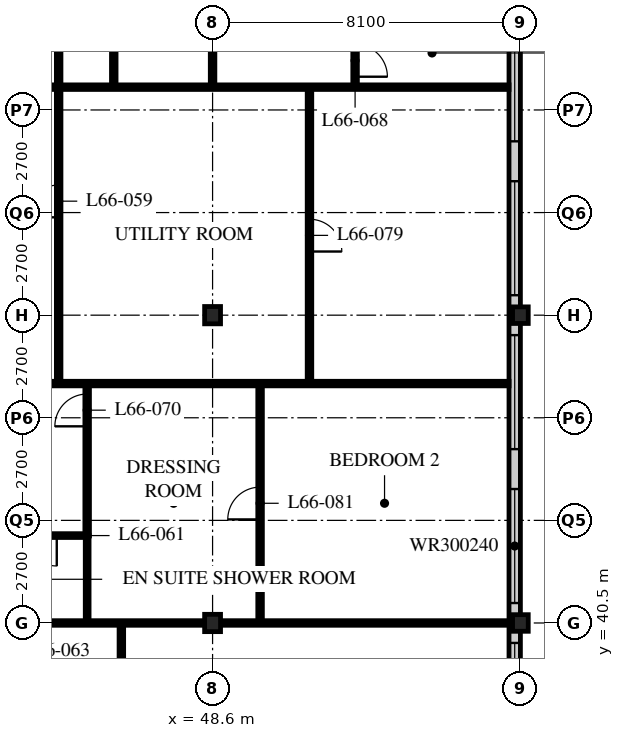
"""IFC4 building model, lengths in metres.
Left out: names, types, materials, properties, quantities, classifications, styles, units other than length and angle.
Written with IfcOpenShell. Run it as: python <this file> out.ifc"""

import sys

from ifc_helpers import new_model, si_unit, direction, frame, frame_2d, origin, origin_2d, place, context, subcontext, project, spatial, rectangle, i_section, extrude, element, fill, save


model = new_model("IFC4")
c1 = context("Model", 3, precision=1e-05, world=origin(), true_north=direction((0.0, 1.0)))
c2 = subcontext(c1, "Body", "Model", "MODEL_VIEW")
j1 = project(units=[si_unit("LENGTHUNIT", "METRE"), si_unit("PLANEANGLEUNIT", "RADIAN")], contexts=[c1])
p1 = place(None, origin())
s1 = spatial("IfcSite", under=j1, at=p1, CompositionType="ELEMENT")
p2 = place(p1, origin())
s2 = spatial("IfcBuilding", under=s1, at=p2, CompositionType="ELEMENT")
p3 = place(p2, frame((0.0, 0.0, 258.0)))
s3 = spatial("IfcBuildingStorey", under=s2, at=p3, CompositionType="ELEMENT", Elevation=258.0)
for number, where, z_axis, x_axis in (
    (1, (48.6, 40.5, 0.0), (0.0, 0.0, 1.0), (1.0, 0.0, 0.0)),
    (2, (48.6, 48.6, 0.0), (0.0, 0.0, 1.0), (1.0, 0.0, 0.0)),
):
    element("IfcColumn", number, at=place(p3, frame(where, z_axis=z_axis, x_axis=x_axis)), inside=s3, PredefinedType="COLUMN", context=c2, shape_type="SweptSolid", body=[
        extrude(i_section(OverallWidth=0.418, OverallDepth=0.456, WebThickness=0.042, FlangeThickness=0.067, FilletRadius=0.015, at=origin_2d()), origin(), (0.0, 0.0, 1.0), 3.9),
    ])
for number, where, z_axis, x_axis in (
    (3, (56.7, 40.5, 0.0), (0.0, 0.0, 1.0), (1.0, 0.0, 0.0)),
    (4, (56.7, 48.6, 0.0), (0.0, 0.0, 1.0), (1.0, 0.0, 0.0)),
):
    element("IfcColumn", number, at=place(p3, frame(where, z_axis=z_axis, x_axis=x_axis)), inside=s3, PredefinedType="COLUMN", context=c2, shape_type="SweptSolid", body=[
        extrude(i_section(OverallWidth=0.412, OverallDepth=0.437, WebThickness=0.036, FlangeThickness=0.058, FilletRadius=0.015, at=origin_2d()), origin(), (0.0, 0.0, 1.0), 3.9),
    ])
p4 = place(p3, frame((56.55, 24.6, 0.0), z_axis=(0.0, 0.0, 1.0), x_axis=(0.0, 1.0, 0.0)))
e5 = element("IfcWall", 5, at=p4, inside=s3, PredefinedType="SOLIDWALL", context=c2, shape_type="SweptSolid", body=[
    extrude(rectangle(XDim=32.1, YDim=0.3, at=frame_2d((16.05, 0.0))), origin(), (0.0, 0.0, 1.0), 3.69),
])
p5 = place(p4, frame((0.225, 0.0, 0.6)))
e6 = element("IfcOpeningElement", 6, at=p5, cuts=e5, PredefinedType="OPENING", context=c2, shape_type="SweptSolid", body=[
    extrude(rectangle(XDim=3.0, YDim=2.4, at=frame_2d((1.5, 1.2))), frame((0.0, 0.16, 0.0), z_axis=(0.0, -1.0, 0.0), x_axis=(1.0, 0.0, 0.0)), (0.0, 0.0, 1.0), 0.32),
])
p6 = place(p4, frame((4.275, 0.0, 0.6)))
e7 = element("IfcOpeningElement", 7, at=p6, cuts=e5, PredefinedType="OPENING", context=c2, shape_type="SweptSolid", body=[
    extrude(rectangle(XDim=3.0, YDim=2.4, at=frame_2d((1.5, 1.2))), frame((0.0, 0.16, 0.0), z_axis=(0.0, -1.0, 0.0), x_axis=(1.0, 0.0, 0.0)), (0.0, 0.0, 1.0), 0.32),
])
p7 = place(p4, frame((8.325, 0.0, 0.6)))
e8 = element("IfcOpeningElement", 8, at=p7, cuts=e5, PredefinedType="OPENING", context=c2, shape_type="SweptSolid", body=[
    extrude(rectangle(XDim=3.0, YDim=2.4, at=frame_2d((1.5, 1.2))), frame((0.0, 0.16, 0.0), z_axis=(0.0, -1.0, 0.0), x_axis=(1.0, 0.0, 0.0)), (0.0, 0.0, 1.0), 0.32),
])
p8 = place(p4, frame((12.375, 0.0, 0.6)))
e9 = element("IfcOpeningElement", 9, at=p8, cuts=e5, PredefinedType="OPENING", context=c2, shape_type="SweptSolid", body=[
    extrude(rectangle(XDim=3.0, YDim=2.4, at=frame_2d((1.5, 1.2))), frame((0.0, 0.16, 0.0), z_axis=(0.0, -1.0, 0.0), x_axis=(1.0, 0.0, 0.0)), (0.0, 0.0, 1.0), 0.32),
])
p9 = place(p4, frame((16.425, 0.0, 0.6)))
e10 = element("IfcOpeningElement", 10, at=p9, cuts=e5, PredefinedType="OPENING", context=c2, shape_type="SweptSolid", body=[
    extrude(rectangle(XDim=3.0, YDim=2.4, at=frame_2d((1.5, 1.2))), frame((0.0, 0.16, 0.0), z_axis=(0.0, -1.0, 0.0), x_axis=(1.0, 0.0, 0.0)), (0.0, 0.0, 1.0), 0.32),
])
p10 = place(p4, frame((20.475, 0.0, 0.6)))
e11 = element("IfcOpeningElement", 11, at=p10, cuts=e5, PredefinedType="OPENING", context=c2, shape_type="SweptSolid", body=[
    extrude(rectangle(XDim=3.0, YDim=2.4, at=frame_2d((1.5, 1.2))), frame((0.0, 0.16, 0.0), z_axis=(0.0, -1.0, 0.0), x_axis=(1.0, 0.0, 0.0)), (0.0, 0.0, 1.0), 0.32),
])
p11 = place(p4, frame((24.525, 0.0, 0.6)))
e12 = element("IfcOpeningElement", 12, at=p11, cuts=e5, PredefinedType="OPENING", context=c2, shape_type="SweptSolid", body=[
    extrude(rectangle(XDim=3.0, YDim=2.4, at=frame_2d((1.5, 1.2))), frame((0.0, 0.16, 0.0), z_axis=(0.0, -1.0, 0.0), x_axis=(1.0, 0.0, 0.0)), (0.0, 0.0, 1.0), 0.32),
])
p12 = place(p4, frame((28.575, 0.0, 0.6)))
e13 = element("IfcOpeningElement", 13, at=p12, cuts=e5, PredefinedType="OPENING", context=c2, shape_type="SweptSolid", body=[
    extrude(rectangle(XDim=3.0, YDim=2.4, at=frame_2d((1.5, 1.2))), frame((0.0, 0.16, 0.0), z_axis=(0.0, -1.0, 0.0), x_axis=(1.0, 0.0, 0.0)), (0.0, 0.0, 1.0), 0.32),
])
p13 = place(p3, frame((42.9, 46.8, 0.0), z_axis=(0.0, 0.0, 1.0), x_axis=(1.0, 0.0, 0.0)))
e14 = element("IfcWall", 14, at=p13, inside=s3, PredefinedType="PARTITIONING", context=c2, shape_type="SweptSolid", body=[
    extrude(rectangle(XDim=13.5, YDim=0.12, at=frame_2d((6.75, 0.0))), origin(), (0.0, 0.0, 1.0), 3.69),
])
p14 = place(p3, frame((36.45, 54.6, 0.0), z_axis=(0.0, 0.0, 1.0), x_axis=(1.0, 0.0, 0.0)))
e15 = element("IfcWall", 15, at=p14, inside=s3, PredefinedType="PARTITIONING", context=c2, shape_type="SweptSolid", body=[
    extrude(rectangle(XDim=19.95, YDim=0.12, at=frame_2d((9.975, 0.0))), origin(), (0.0, 0.0, 1.0), 3.69),
])
p15 = place(p14, frame((1.675, 0.0, 0.0)))
e16 = element("IfcOpeningElement", 16, at=p15, cuts=e15, PredefinedType="OPENING", context=c2, shape_type="SweptSolid", body=[
    extrude(rectangle(XDim=0.85, YDim=2.1, at=frame_2d((0.425, 1.05))), frame((0.0, 0.07, 0.0), z_axis=(0.0, -1.0, 0.0), x_axis=(1.0, 0.0, 0.0)), (0.0, 0.0, 1.0), 0.14),
])
p16 = place(p3, frame((44.55, 64.5, 0.0), z_axis=(0.0, 0.0, 1.0), x_axis=(0.0, -1.0, 0.0)))
e17 = element("IfcWall", 17, at=p16, inside=s3, PredefinedType="PARTITIONING", context=c2, shape_type="SweptSolid", body=[
    extrude(rectangle(XDim=17.7, YDim=0.12, at=frame_2d((8.85, 0.0))), origin(), (0.0, 0.0, 1.0), 3.69),
])
p17 = place(p16, frame((12.475, 0.0, 0.0)))
e18 = element("IfcOpeningElement", 18, at=p17, cuts=e17, PredefinedType="OPENING", context=c2, shape_type="SweptSolid", body=[
    extrude(rectangle(XDim=0.85, YDim=2.1, at=frame_2d((0.425, 1.05))), frame((0.0, 0.07, 0.0), z_axis=(0.0, -1.0, 0.0), x_axis=(1.0, 0.0, 0.0)), (0.0, 0.0, 1.0), 0.14),
])
p18 = place(p16, frame((4.525, 0.0, 0.0)))
e19 = element("IfcOpeningElement", 19, at=p18, cuts=e17, PredefinedType="OPENING", context=c2, shape_type="SweptSolid", body=[
    extrude(rectangle(XDim=0.85, YDim=2.1, at=frame_2d((0.425, 1.05))), frame((0.0, 0.07, 0.0), z_axis=(0.0, -1.0, 0.0), x_axis=(1.0, 0.0, 0.0)), (0.0, 0.0, 1.0), 0.14),
])
p19 = place(p3, frame((42.9, 42.8, 0.0), z_axis=(0.0, 0.0, 1.0), x_axis=(1.0, 0.0, 0.0)))
e20 = element("IfcWall", 20, at=p19, inside=s3, PredefinedType="PARTITIONING", context=c2, shape_type="SweptSolid", body=[
    extrude(rectangle(XDim=2.4, YDim=0.1, at=frame_2d((1.2, 0.0))), origin(), (0.0, 0.0, 1.0), 3.69),
])
p20 = place(p19, frame((0.8, 0.0, 0.0)))
e21 = element("IfcOpeningElement", 21, at=p20, cuts=e20, PredefinedType="OPENING", context=c2, shape_type="SweptSolid", body=[
    extrude(rectangle(XDim=0.8, YDim=2.1, at=frame_2d((0.4, 1.05))), frame((0.0, 0.06, 0.0), z_axis=(0.0, -1.0, 0.0), x_axis=(1.0, 0.0, 0.0)), (0.0, 0.0, 1.0), 0.12),
])
p21 = place(p3, frame((45.3, 42.8, 0.0), z_axis=(0.0, 0.0, 1.0), x_axis=(0.0, -1.0, 0.0)))
e22 = element("IfcWall", 22, at=p21, inside=s3, PredefinedType="PARTITIONING", context=c2, shape_type="SweptSolid", body=[
    extrude(rectangle(XDim=2.3, YDim=0.1, at=frame_2d((1.15, 0.0))), origin(), (0.0, 0.0, 1.0), 3.69),
])
p22 = place(p3, frame((42.9, 40.5, 0.0), z_axis=(0.0, 0.0, 1.0), x_axis=(1.0, 0.0, 0.0)))
e23 = element("IfcWall", 23, at=p22, inside=s3, PredefinedType="PARTITIONING", context=c2, shape_type="SweptSolid", body=[
    extrude(rectangle(XDim=13.5, YDim=0.12, at=frame_2d((6.75, 0.0))), origin(), (0.0, 0.0, 1.0), 3.078),
])
p23 = place(p3, frame((52.35, 54.6, 0.0), z_axis=(0.0, 0.0, 1.0), x_axis=(0.0, 1.0, 0.0)))
e24 = element("IfcWall", 24, at=p23, inside=s3, PredefinedType="PARTITIONING", context=c2, shape_type="SweptSolid", body=[
    extrude(rectangle(XDim=1.8, YDim=0.12, at=frame_2d((0.9, 0.0))), origin(), (0.0, 0.0, 1.0), 3.69),
])
p24 = place(p23, frame((0.275, 0.0, 0.0)))
e25 = element("IfcOpeningElement", 25, at=p24, cuts=e24, PredefinedType="OPENING", context=c2, shape_type="SweptSolid", body=[
    extrude(rectangle(XDim=0.85, YDim=2.1, at=frame_2d((0.425, 1.05))), frame((0.0, 0.07, 0.0), z_axis=(0.0, -1.0, 0.0), x_axis=(1.0, 0.0, 0.0)), (0.0, 0.0, 1.0), 0.14),
])
p25 = place(p3, frame((45.3, 46.8, 0.0), z_axis=(0.0, 0.0, 1.0), x_axis=(0.0, -1.0, 0.0)))
e26 = element("IfcWall", 26, at=p25, inside=s3, PredefinedType="PARTITIONING", context=c2, shape_type="SweptSolid", body=[
    extrude(rectangle(XDim=4.01, YDim=0.12, at=frame_2d((2.005, 0.0))), origin(), (0.0, 0.0, 1.0), 3.69),
])
p26 = place(p25, frame((0.275, 0.0, 0.0)))
e27 = element("IfcOpeningElement", 27, at=p26, cuts=e26, PredefinedType="OPENING", context=c2, shape_type="SweptSolid", body=[
    extrude(rectangle(XDim=0.85, YDim=2.1, at=frame_2d((0.425, 1.05))), frame((0.0, 0.07, 0.0), z_axis=(0.0, -1.0, 0.0), x_axis=(1.0, 0.0, 0.0)), (0.0, 0.0, 1.0), 0.14),
])
p27 = place(p3, frame((46.2, 28.35, 0.0), z_axis=(0.0, 0.0, 1.0), x_axis=(0.0, 1.0, 0.0)))
e28 = element("IfcWall", 28, at=p27, inside=s3, PredefinedType="PARTITIONING", context=c2, shape_type="SweptSolid", body=[
    extrude(rectangle(XDim=12.15, YDim=0.12, at=frame_2d((6.075, 0.0))), origin(), (0.0, 0.0, 1.0), 3.69),
])
p28 = place(p27, frame((1.6, 0.0, 0.0)))
e29 = element("IfcOpeningElement", 29, at=p28, cuts=e28, PredefinedType="OPENING", context=c2, shape_type="SweptSolid", body=[
    extrude(rectangle(XDim=0.85, YDim=2.1, at=frame_2d((0.425, 1.05))), frame((0.0, 0.07, 0.0), z_axis=(0.0, -1.0, 0.0), x_axis=(1.0, 0.0, 0.0)), (0.0, 0.0, 1.0), 0.14),
])
p29 = place(p27, frame((9.7, 0.0, 0.0)))
e30 = element("IfcOpeningElement", 30, at=p29, cuts=e28, PredefinedType="OPENING", context=c2, shape_type="SweptSolid", body=[
    extrude(rectangle(XDim=0.85, YDim=2.1, at=frame_2d((0.425, 1.05))), frame((0.0, 0.07, 0.0), z_axis=(0.0, -1.0, 0.0), x_axis=(1.0, 0.0, 0.0)), (0.0, 0.0, 1.0), 0.14),
])
p30 = place(p27, frame((5.65, 0.0, 0.0)))
e31 = element("IfcOpeningElement", 31, at=p30, cuts=e28, PredefinedType="OPENING", context=c2, shape_type="SweptSolid", body=[
    extrude(rectangle(XDim=0.85, YDim=2.1, at=frame_2d((0.425, 1.05))), frame((0.0, 0.07, 0.0), z_axis=(0.0, -1.0, 0.0), x_axis=(1.0, 0.0, 0.0)), (0.0, 0.0, 1.0), 0.14),
])
p31 = place(p3, frame((51.15, 46.8, 0.0), z_axis=(0.0, 0.0, 1.0), x_axis=(0.0, 1.0, 0.0)))
e32 = element("IfcWall", 32, at=p31, inside=s3, PredefinedType="PARTITIONING", context=c2, shape_type="SweptSolid", body=[
    extrude(rectangle(XDim=7.8, YDim=0.12, at=frame_2d((3.9, 0.0))), origin(), (0.0, 0.0, 1.0), 3.69),
])
p32 = place(p31, frame((3.475, 0.0, 0.0)))
e33 = element("IfcOpeningElement", 33, at=p32, cuts=e32, PredefinedType="OPENING", context=c2, shape_type="SweptSolid", body=[
    extrude(rectangle(XDim=0.85, YDim=2.1, at=frame_2d((0.425, 1.05))), frame((0.0, 0.07, 0.0), z_axis=(0.0, -1.0, 0.0), x_axis=(1.0, 0.0, 0.0)), (0.0, 0.0, 1.0), 0.14),
])
p33 = place(p3, frame((46.0, 54.6, 0.0), z_axis=(0.0, 0.0, 1.0), x_axis=(0.0, 1.0, 0.0)))
e34 = element("IfcWall", 34, at=p33, inside=s3, PredefinedType="PARTITIONING", context=c2, shape_type="SweptSolid", body=[
    extrude(rectangle(XDim=5.85, YDim=0.12, at=frame_2d((2.925, 0.0))), origin(), (0.0, 0.0, 1.0), 3.69),
])
p34 = place(p33, frame((2.5, 0.0, 0.0)))
e35 = element("IfcOpeningElement", 35, at=p34, cuts=e34, PredefinedType="OPENING", context=c2, shape_type="SweptSolid", body=[
    extrude(rectangle(XDim=0.85, YDim=2.1, at=frame_2d((0.425, 1.05))), frame((0.0, 0.07, 0.0), z_axis=(0.0, -1.0, 0.0), x_axis=(1.0, 0.0, 0.0)), (0.0, 0.0, 1.0), 0.14),
])
p35 = place(p3, frame((49.85, 40.5, 0.0), z_axis=(0.0, 0.0, 1.0), x_axis=(0.0, 1.0, 0.0)))
e36 = element("IfcWall", 36, at=p35, inside=s3, PredefinedType="PARTITIONING", context=c2, shape_type="SweptSolid", body=[
    extrude(rectangle(XDim=6.3, YDim=0.12, at=frame_2d((3.15, 0.0))), origin(), (0.0, 0.0, 1.0), 3.69),
])
p36 = place(p35, frame((2.725, 0.0, 0.0)))
e37 = element("IfcOpeningElement", 37, at=p36, cuts=e36, PredefinedType="OPENING", context=c2, shape_type="SweptSolid", body=[
    extrude(rectangle(XDim=0.85, YDim=2.1, at=frame_2d((0.425, 1.05))), frame((0.0, 0.07, 0.0), z_axis=(0.0, -1.0, 0.0), x_axis=(1.0, 0.0, 0.0)), (0.0, 0.0, 1.0), 0.14),
])
p37 = place(p3, frame((48.6, 54.6, 0.0), z_axis=(0.0, 0.0, 1.0), x_axis=(0.0, 1.0, 0.0)))
e38 = element("IfcWall", 38, at=p37, inside=s3, PredefinedType="PARTITIONING", context=c2, shape_type="SweptSolid", body=[
    extrude(rectangle(XDim=1.897, YDim=0.12, at=frame_2d((0.948, 0.0))), origin(), (0.0, 0.0, 1.0), 3.078),
])
p38 = place(p8, origin())
e39 = element("IfcWindow", 39, at=p38, inside=s3, PartitioningType="SINGLE_PANEL", PredefinedType="WINDOW", context=c2, shape_type="SweptSolid", body=[
    extrude(rectangle(XDim=3.0, YDim=2.4, at=frame_2d((1.5, 1.2))), frame((0.0, 0.03, 0.0), z_axis=(0.0, -1.0, 0.0), x_axis=(1.0, 0.0, 0.0)), (0.0, 0.0, 1.0), 0.06),
])
fill(e9, e39)
p39 = place(p9, origin())
e40 = element("IfcWindow", 40, at=p39, inside=s3, PartitioningType="SINGLE_PANEL", PredefinedType="WINDOW", context=c2, shape_type="SweptSolid", body=[
    extrude(rectangle(XDim=3.0, YDim=2.4, at=frame_2d((1.5, 1.2))), frame((0.0, 0.03, 0.0), z_axis=(0.0, -1.0, 0.0), x_axis=(1.0, 0.0, 0.0)), (0.0, 0.0, 1.0), 0.06),
])
fill(e10, e40)
p40 = place(p10, origin())
e41 = element("IfcWindow", 41, at=p40, inside=s3, PartitioningType="SINGLE_PANEL", PredefinedType="WINDOW", context=c2, shape_type="SweptSolid", body=[
    extrude(rectangle(XDim=3.0, YDim=2.4, at=frame_2d((1.5, 1.2))), frame((0.0, 0.03, 0.0), z_axis=(0.0, -1.0, 0.0), x_axis=(1.0, 0.0, 0.0)), (0.0, 0.0, 1.0), 0.06),
])
fill(e11, e41)
p41 = place(p11, origin())
e42 = element("IfcWindow", 42, at=p41, inside=s3, PartitioningType="SINGLE_PANEL", PredefinedType="WINDOW", context=c2, shape_type="SweptSolid", body=[
    extrude(rectangle(XDim=3.0, YDim=2.4, at=frame_2d((1.5, 1.2))), frame((0.0, 0.03, 0.0), z_axis=(0.0, -1.0, 0.0), x_axis=(1.0, 0.0, 0.0)), (0.0, 0.0, 1.0), 0.06),
])
fill(e12, e42)
p42 = place(p12, origin())
e43 = element("IfcWindow", 43, at=p42, inside=s3, PartitioningType="SINGLE_PANEL", PredefinedType="WINDOW", context=c2, shape_type="SweptSolid", body=[
    extrude(rectangle(XDim=3.0, YDim=2.4, at=frame_2d((1.5, 1.2))), frame((0.0, 0.03, 0.0), z_axis=(0.0, -1.0, 0.0), x_axis=(1.0, 0.0, 0.0)), (0.0, 0.0, 1.0), 0.06),
])
fill(e13, e43)
p43 = place(p17, origin())
e44 = element("IfcDoor", 44, at=p43, inside=s3, OperationType="SINGLE_SWING_LEFT", PredefinedType="DOOR", context=c2, shape_type="SweptSolid", body=[
    extrude(rectangle(XDim=0.85, YDim=2.1, at=frame_2d((0.425, 1.05))), frame((0.0, 0.025, 0.0), z_axis=(0.0, -1.0, 0.0), x_axis=(1.0, 0.0, 0.0)), (0.0, 0.0, 1.0), 0.05),
])
fill(e18, e44)
p44 = place(p20, origin())
e45 = element("IfcDoor", 45, at=p44, inside=s3, OperationType="SINGLE_SWING_LEFT", PredefinedType="DOOR", context=c2, shape_type="SweptSolid", body=[
    extrude(rectangle(XDim=0.8, YDim=2.1, at=frame_2d((0.4, 1.05))), frame((0.0, 0.025, 0.0), z_axis=(0.0, -1.0, 0.0), x_axis=(1.0, 0.0, 0.0)), (0.0, 0.0, 1.0), 0.05),
])
fill(e21, e45)
p45 = place(p24, origin())
e46 = element("IfcDoor", 46, at=p45, inside=s3, OperationType="SINGLE_SWING_RIGHT", PredefinedType="DOOR", context=c2, shape_type="SweptSolid", body=[
    extrude(rectangle(XDim=0.85, YDim=2.1, at=frame_2d((0.425, 1.05))), frame((0.0, 0.025, 0.0), z_axis=(0.0, -1.0, 0.0), x_axis=(1.0, 0.0, 0.0)), (0.0, 0.0, 1.0), 0.05),
])
fill(e25, e46)
p46 = place(p26, origin())
e47 = element("IfcDoor", 47, at=p46, inside=s3, OperationType="SINGLE_SWING_LEFT", PredefinedType="DOOR", context=c2, shape_type="SweptSolid", body=[
    extrude(rectangle(XDim=0.85, YDim=2.1, at=frame_2d((0.425, 1.05))), frame((0.0, 0.025, 0.0), z_axis=(0.0, -1.0, 0.0), x_axis=(1.0, 0.0, 0.0)), (0.0, 0.0, 1.0), 0.05),
])
fill(e27, e47)
p47 = place(p32, origin())
e48 = element("IfcDoor", 48, at=p47, inside=s3, OperationType="SINGLE_SWING_RIGHT", PredefinedType="DOOR", context=c2, shape_type="SweptSolid", body=[
    extrude(rectangle(XDim=0.85, YDim=2.1, at=frame_2d((0.425, 1.05))), frame((0.0, 0.025, 0.0), z_axis=(0.0, -1.0, 0.0), x_axis=(1.0, 0.0, 0.0)), (0.0, 0.0, 1.0), 0.05),
])
fill(e33, e48)
p48 = place(p36, origin())
e49 = element("IfcDoor", 49, at=p48, inside=s3, OperationType="SINGLE_SWING_LEFT", PredefinedType="DOOR", context=c2, shape_type="SweptSolid", body=[
    extrude(rectangle(XDim=0.85, YDim=2.1, at=frame_2d((0.425, 1.05))), frame((0.0, 0.025, 0.0), z_axis=(0.0, -1.0, 0.0), x_axis=(1.0, 0.0, 0.0)), (0.0, 0.0, 1.0), 0.05),
])
fill(e37, e49)
save(model, sys.argv[1])
